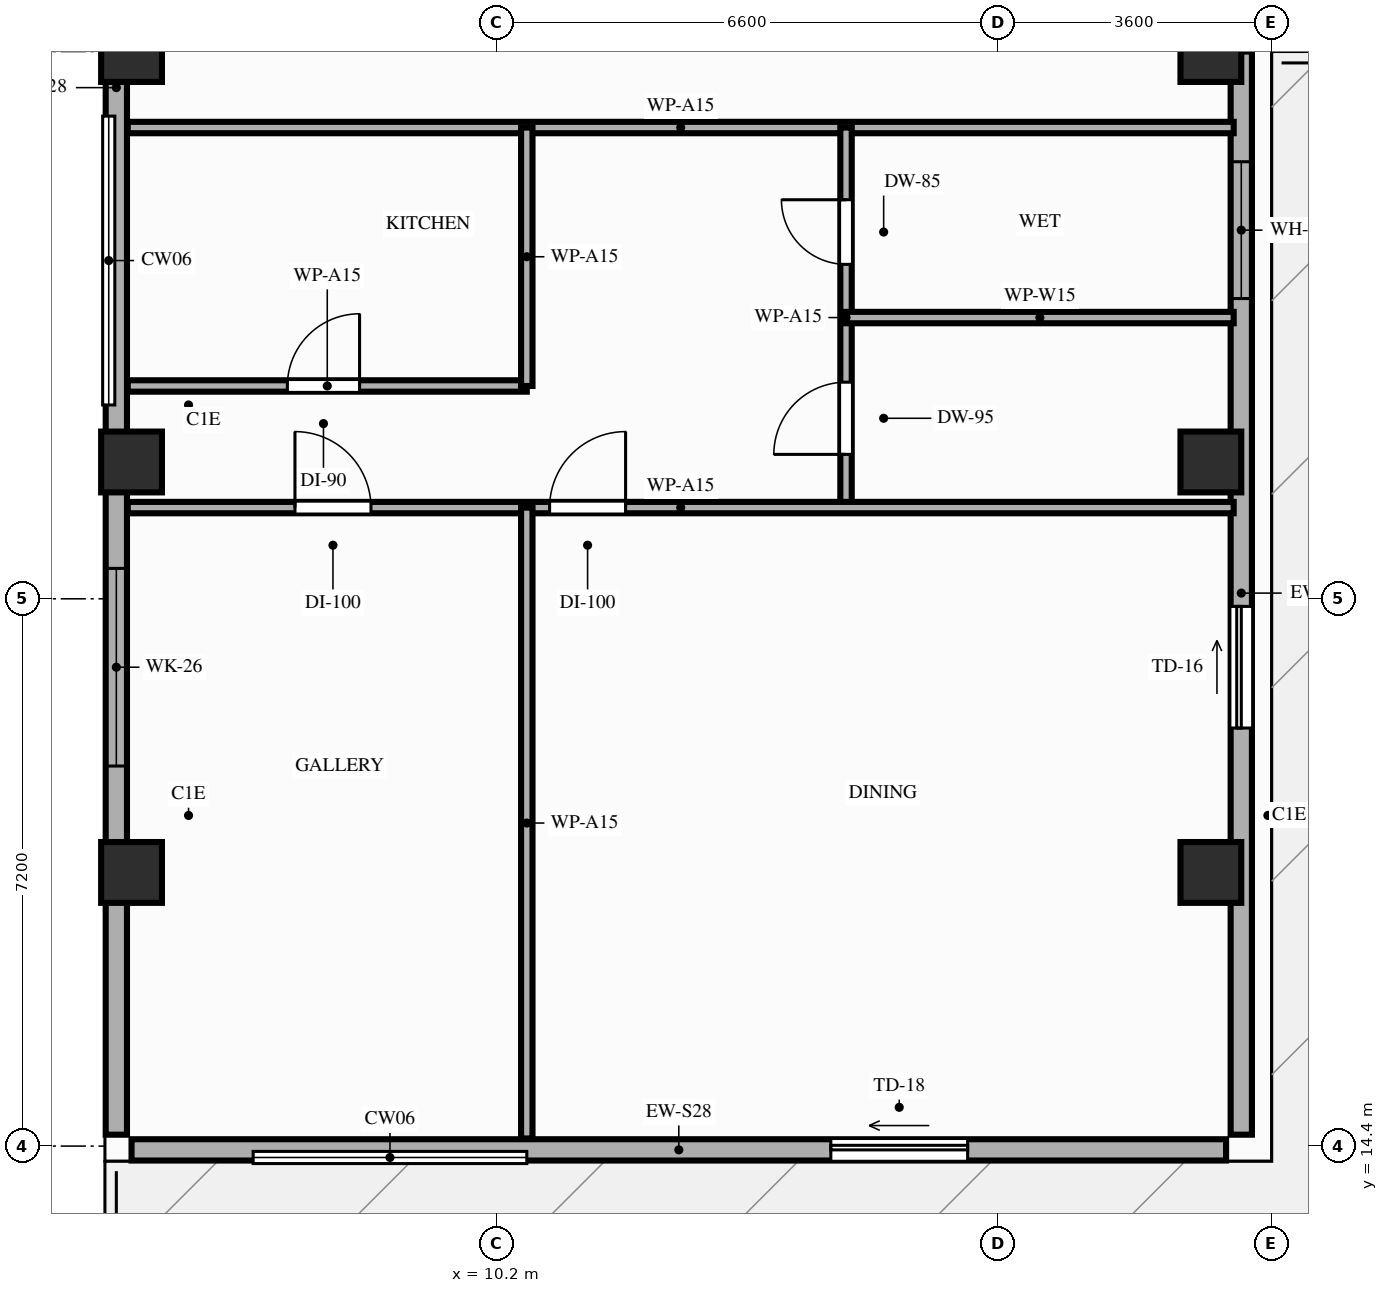
"""IFC4 building model, lengths in metres.
Left out: names, types, materials, properties, quantities, classifications, styles, units other than length and angle.
Written with IfcOpenShell. Run it as: python <this file> out.ifc"""

import sys

from ifc_helpers import new_model, si_unit, direction, frame, frame_2d, origin, origin_2d, place, context, subcontext, project, spatial, rectangle, extrude, element, fill, save


model = new_model("IFC4")
c1 = context("Model", 3, precision=1e-05, world=origin(), true_north=direction((0.0, 1.0)))
c2 = subcontext(c1, "Body", "Model", "MODEL_VIEW")
j1 = project(units=[si_unit("LENGTHUNIT", "METRE"), si_unit("PLANEANGLEUNIT", "RADIAN")], contexts=[c1])
p1 = place(None, origin())
s1 = spatial("IfcSite", under=j1, at=p1, CompositionType="ELEMENT")
p2 = place(p1, origin())
s2 = spatial("IfcBuilding", under=s1, at=p2, CompositionType="ELEMENT")
p3 = place(p2, frame((0.0, 0.0, 250.4)))
s3 = spatial("IfcBuildingStorey", under=s2, at=p3, CompositionType="ELEMENT", Elevation=250.4)
for number, where, z_axis, x_axis in (
    (1, (5.4, 18.0, 0.0), (0.0, 0.0, 1.0), (1.0, 0.0, 0.0)),
    (2, (19.6, 18.0, 0.0), (0.0, 0.0, 1.0), (1.0, 0.0, 0.0)),
    (3, (5.4, 23.4, 0.0), (0.0, 0.0, 1.0), (1.0, 0.0, 0.0)),
    (4, (19.6, 23.4, 0.0), (0.0, 0.0, 1.0), (1.0, 0.0, 0.0)),
    (5, (5.4, 28.8, 0.0), (0.0, 0.0, 1.0), (1.0, 0.0, 0.0)),
    (6, (19.6, 28.8, 0.0), (0.0, 0.0, 1.0), (1.0, 0.0, 0.0)),
):
    element("IfcColumn", number, at=place(p3, frame(where, z_axis=z_axis, x_axis=x_axis)), inside=s3, PredefinedType="COLUMN", context=c2, shape_type="SweptSolid", body=[
        extrude(rectangle(XDim=0.8, YDim=0.8, at=origin_2d()), origin(), (0.0, 0.0, 1.0), 3.8),
    ])
p4 = place(p3, frame((5.4, 14.35, 0.0), z_axis=(0.0, 0.0, 1.0), x_axis=(1.0, 0.0, 0.0)))
e7 = element("IfcWall", 7, at=p4, inside=s3, PredefinedType="STANDARD", context=c2, shape_type="SweptSolid", body=[
    extrude(rectangle(XDim=14.4, YDim=0.28, at=frame_2d((7.2, 0.0))), origin(), (0.0, 0.0, 1.0), 3.58),
])
p5 = place(p4, frame((9.2, 0.0, 0.0)))
e8 = element("IfcOpeningElement", 8, at=p5, cuts=e7, PredefinedType="OPENING", context=c2, shape_type="SweptSolid", body=[
    extrude(rectangle(XDim=1.8, YDim=2.2, at=frame_2d((0.9, 1.1))), frame((0.0, 0.15, 0.0), z_axis=(0.0, -1.0, 0.0), x_axis=(1.0, 0.0, 0.0)), (0.0, 0.0, 1.0), 0.3),
])
p6 = place(p3, frame((5.2, 42.1, 0.0), z_axis=(0.0, 0.0, 1.0), x_axis=(0.0, -1.0, 0.0)))
e9 = element("IfcWall", 9, at=p6, inside=s3, PredefinedType="STANDARD", context=c2, shape_type="SweptSolid", body=[
    extrude(rectangle(XDim=27.55, YDim=0.28, at=frame_2d((13.775, 0.0))), origin(), (0.0, 0.0, 1.0), 3.58),
])
p7 = place(p6, frame((20.1, 0.0, 0.85)))
e10 = element("IfcOpeningElement", 10, at=p7, cuts=e9, PredefinedType="OPENING", context=c2, shape_type="SweptSolid", body=[
    extrude(rectangle(XDim=2.6, YDim=2.2, at=frame_2d((1.3, 1.1))), frame((0.0, 0.15, 0.0), z_axis=(0.0, -1.0, 0.0), x_axis=(1.0, 0.0, 0.0)), (0.0, 0.0, 1.0), 0.3),
])
p8 = place(p6, frame((3.4, 0.0, 0.85)))
e11 = element("IfcOpeningElement", 11, at=p8, cuts=e9, PredefinedType="OPENING", context=c2, shape_type="SweptSolid", body=[
    extrude(rectangle(XDim=2.6, YDim=2.2, at=frame_2d((1.3, 1.1))), frame((0.0, 0.15, 0.0), z_axis=(0.0, -1.0, 0.0), x_axis=(1.0, 0.0, 0.0)), (0.0, 0.0, 1.0), 0.3),
])
p9 = place(p3, frame((20.0, 14.55, 0.0), z_axis=(0.0, 0.0, 1.0), x_axis=(0.0, 1.0, 0.0)))
e12 = element("IfcWall", 12, at=p9, inside=s3, PredefinedType="STANDARD", context=c2, shape_type="SweptSolid", body=[
    extrude(rectangle(XDim=14.25, YDim=0.28, at=frame_2d((7.125, 0.0))), origin(), (0.0, 0.0, 1.0), 3.58),
])
p10 = place(p9, frame((11.0, 0.0, 0.85)))
e13 = element("IfcOpeningElement", 13, at=p10, cuts=e12, PredefinedType="OPENING", context=c2, shape_type="SweptSolid", body=[
    extrude(rectangle(XDim=1.8, YDim=1.75, at=frame_2d((0.9, 0.875))), frame((0.0, 0.15, 0.0), z_axis=(0.0, -1.0, 0.0), x_axis=(1.0, 0.0, 0.0)), (0.0, 0.0, 1.0), 0.3),
])
p11 = place(p9, frame((5.35, 0.0, 0.0)))
e14 = element("IfcOpeningElement", 14, at=p11, cuts=e12, PredefinedType="OPENING", context=c2, shape_type="SweptSolid", body=[
    extrude(rectangle(XDim=1.6, YDim=2.15, at=frame_2d((0.8, 1.075))), frame((0.0, 0.15, 0.0), z_axis=(0.0, -1.0, 0.0), x_axis=(1.0, 0.0, 0.0)), (0.0, 0.0, 1.0), 0.3),
])
p12 = place(p3, frame((5.35, 27.8, 0.0), z_axis=(0.0, 0.0, 1.0), x_axis=(1.0, 0.0, 0.0)))
e15 = element("IfcWall", 15, at=p12, inside=s3, PredefinedType="PARTITIONING", context=c2, shape_type="SweptSolid", body=[
    extrude(rectangle(XDim=14.55, YDim=0.15, at=frame_2d((7.275, 0.0))), origin(), (0.0, 0.0, 1.0), 3.58),
])
p13 = place(p3, frame((5.35, 24.4, 0.0), z_axis=(0.0, 0.0, 1.0), x_axis=(1.0, 0.0, 0.0)))
e16 = element("IfcWall", 16, at=p13, inside=s3, PredefinedType="PARTITIONING", context=c2, shape_type="SweptSolid", body=[
    extrude(rectangle(XDim=5.25, YDim=0.15, at=frame_2d((2.625, 0.0))), origin(), (0.0, 0.0, 1.0), 3.58),
])
p14 = place(p13, frame((2.1, 0.0, 0.0)))
e17 = element("IfcOpeningElement", 17, at=p14, cuts=e16, PredefinedType="OPENING", context=c2, shape_type="SweptSolid", body=[
    extrude(rectangle(XDim=0.95, YDim=2.15, at=frame_2d((0.475, 1.075))), frame((0.0, 0.085, 0.0), z_axis=(0.0, -1.0, 0.0), x_axis=(1.0, 0.0, 0.0)), (0.0, 0.0, 1.0), 0.17),
])
p15 = place(p3, frame((10.6, 24.4, 0.0), z_axis=(0.0, 0.0, 1.0), x_axis=(0.0, 1.0, 0.0)))
e18 = element("IfcWall", 18, at=p15, inside=s3, PredefinedType="PARTITIONING", context=c2, shape_type="SweptSolid", body=[
    extrude(rectangle(XDim=3.4, YDim=0.15, at=frame_2d((1.7, 0.0))), origin(), (0.0, 0.0, 1.0), 3.58),
])
p16 = place(p3, frame((14.8, 22.8, 0.0), z_axis=(0.0, 0.0, 1.0), x_axis=(0.0, 1.0, 0.0)))
e19 = element("IfcWall", 19, at=p16, inside=s3, PredefinedType="PARTITIONING", context=c2, shape_type="SweptSolid", body=[
    extrude(rectangle(XDim=5.0, YDim=0.15, at=frame_2d((2.5, 0.0))), origin(), (0.0, 0.0, 1.0), 3.58),
])
p17 = place(p16, frame((3.2, 0.0, 0.0)))
e20 = element("IfcOpeningElement", 20, at=p17, cuts=e19, PredefinedType="OPENING", context=c2, shape_type="SweptSolid", body=[
    extrude(rectangle(XDim=0.85, YDim=2.1, at=frame_2d((0.425, 1.05))), frame((0.0, 0.085, 0.0), z_axis=(0.0, -1.0, 0.0), x_axis=(1.0, 0.0, 0.0)), (0.0, 0.0, 1.0), 0.17),
])
p18 = place(p16, frame((0.7, 0.0, 0.0)))
e21 = element("IfcOpeningElement", 21, at=p18, cuts=e19, PredefinedType="OPENING", context=c2, shape_type="SweptSolid", body=[
    extrude(rectangle(XDim=0.95, YDim=2.1, at=frame_2d((0.475, 1.05))), frame((0.0, 0.085, 0.0), z_axis=(0.0, -1.0, 0.0), x_axis=(1.0, 0.0, 0.0)), (0.0, 0.0, 1.0), 0.17),
])
p19 = place(p3, frame((5.35, 22.8, 0.0), z_axis=(0.0, 0.0, 1.0), x_axis=(1.0, 0.0, 0.0)))
e22 = element("IfcWall", 22, at=p19, inside=s3, PredefinedType="PARTITIONING", context=c2, shape_type="SweptSolid", body=[
    extrude(rectangle(XDim=14.55, YDim=0.15, at=frame_2d((7.275, 0.0))), origin(), (0.0, 0.0, 1.0), 3.58),
])
p20 = place(p19, frame((2.2, 0.0, 0.0)))
e23 = element("IfcOpeningElement", 23, at=p20, cuts=e22, PredefinedType="OPENING", context=c2, shape_type="SweptSolid", body=[
    extrude(rectangle(XDim=1.0, YDim=2.15, at=frame_2d((0.5, 1.075))), frame((0.0, 0.085, 0.0), z_axis=(0.0, -1.0, 0.0), x_axis=(1.0, 0.0, 0.0)), (0.0, 0.0, 1.0), 0.17),
])
p21 = place(p19, frame((5.55, 0.0, 0.0)))
e24 = element("IfcOpeningElement", 24, at=p21, cuts=e22, PredefinedType="OPENING", context=c2, shape_type="SweptSolid", body=[
    extrude(rectangle(XDim=1.0, YDim=2.15, at=frame_2d((0.5, 1.075))), frame((0.0, 0.085, 0.0), z_axis=(0.0, -1.0, 0.0), x_axis=(1.0, 0.0, 0.0)), (0.0, 0.0, 1.0), 0.17),
])
p22 = place(p3, frame((10.6, 14.5, 0.0), z_axis=(0.0, 0.0, 1.0), x_axis=(0.0, 1.0, 0.0)))
e25 = element("IfcWall", 25, at=p22, inside=s3, PredefinedType="PARTITIONING", context=c2, shape_type="SweptSolid", body=[
    extrude(rectangle(XDim=8.3, YDim=0.15, at=frame_2d((4.15, 0.0))), origin(), (0.0, 0.0, 1.0), 3.58),
])
p23 = place(p3, frame((14.8, 25.3, 0.0), z_axis=(0.0, 0.0, 1.0), x_axis=(1.0, 0.0, 0.0)))
e26 = element("IfcWall", 26, at=p23, inside=s3, PredefinedType="PARTITIONING", context=c2, shape_type="SweptSolid", body=[
    extrude(rectangle(XDim=5.1, YDim=0.15, at=frame_2d((2.55, 0.0))), origin(), (0.0, 0.0, 1.0), 3.58),
])
p24 = place(p7, origin())
e27 = element("IfcWindow", 27, at=p24, inside=s3, PartitioningType="SINGLE_PANEL", PredefinedType="WINDOW", context=c2, shape_type="SweptSolid", body=[
    extrude(rectangle(XDim=2.6, YDim=2.2, at=frame_2d((1.3, 1.1))), frame((0.0, 0.03, 0.0), z_axis=(0.0, -1.0, 0.0), x_axis=(1.0, 0.0, 0.0)), (0.0, 0.0, 1.0), 0.06),
])
fill(e10, e27)
p25 = place(p10, origin())
e28 = element("IfcWindow", 28, at=p25, inside=s3, PartitioningType="SINGLE_PANEL", PredefinedType="WINDOW", context=c2, shape_type="SweptSolid", body=[
    extrude(rectangle(XDim=1.8, YDim=1.75, at=frame_2d((0.9, 0.875))), frame((0.0, 0.03, 0.0), z_axis=(0.0, -1.0, 0.0), x_axis=(1.0, 0.0, 0.0)), (0.0, 0.0, 1.0), 0.06),
])
fill(e13, e28)
p26 = place(p5, origin())
e29 = element("IfcDoor", 29, at=p26, inside=s3, OperationType="SLIDING_TO_LEFT", PredefinedType="DOOR", context=c2, shape_type="SweptSolid", body=[
    extrude(rectangle(XDim=1.8, YDim=2.2, at=frame_2d((0.9, 1.1))), frame((0.0, 0.025, 0.0), z_axis=(0.0, -1.0, 0.0), x_axis=(1.0, 0.0, 0.0)), (0.0, 0.0, 1.0), 0.05),
])
fill(e8, e29)
p27 = place(p11, origin())
e30 = element("IfcDoor", 30, at=p27, inside=s3, OperationType="SLIDING_TO_RIGHT", PredefinedType="DOOR", context=c2, shape_type="SweptSolid", body=[
    extrude(rectangle(XDim=1.6, YDim=2.15, at=frame_2d((0.8, 1.075))), frame((0.0, 0.025, 0.0), z_axis=(0.0, -1.0, 0.0), x_axis=(1.0, 0.0, 0.0)), (0.0, 0.0, 1.0), 0.05),
])
fill(e14, e30)
p28 = place(p17, origin())
e31 = element("IfcDoor", 31, at=p28, inside=s3, OperationType="SINGLE_SWING_RIGHT", PredefinedType="DOOR", context=c2, shape_type="SweptSolid", body=[
    extrude(rectangle(XDim=0.85, YDim=2.1, at=frame_2d((0.425, 1.05))), frame((0.0, 0.025, 0.0), z_axis=(0.0, -1.0, 0.0), x_axis=(1.0, 0.0, 0.0)), (0.0, 0.0, 1.0), 0.05),
])
fill(e20, e31)
p29 = place(p18, origin())
e32 = element("IfcDoor", 32, at=p29, inside=s3, OperationType="SINGLE_SWING_LEFT", PredefinedType="DOOR", context=c2, shape_type="SweptSolid", body=[
    extrude(rectangle(XDim=0.95, YDim=2.1, at=frame_2d((0.475, 1.05))), frame((0.0, 0.025, 0.0), z_axis=(0.0, -1.0, 0.0), x_axis=(1.0, 0.0, 0.0)), (0.0, 0.0, 1.0), 0.05),
])
fill(e21, e32)
p30 = place(p14, origin())
e33 = element("IfcDoor", 33, at=p30, inside=s3, OperationType="SINGLE_SWING_RIGHT", PredefinedType="DOOR", context=c2, shape_type="SweptSolid", body=[
    extrude(rectangle(XDim=0.95, YDim=2.15, at=frame_2d((0.475, 1.075))), frame((0.0, 0.025, 0.0), z_axis=(0.0, -1.0, 0.0), x_axis=(1.0, 0.0, 0.0)), (0.0, 0.0, 1.0), 0.05),
])
fill(e17, e33)
p31 = place(p20, origin())
e34 = element("IfcDoor", 34, at=p31, inside=s3, OperationType="SINGLE_SWING_LEFT", PredefinedType="DOOR", context=c2, shape_type="SweptSolid", body=[
    extrude(rectangle(XDim=1.0, YDim=2.15, at=frame_2d((0.5, 1.075))), frame((0.0, 0.025, 0.0), z_axis=(0.0, -1.0, 0.0), x_axis=(1.0, 0.0, 0.0)), (0.0, 0.0, 1.0), 0.05),
])
fill(e23, e34)
p32 = place(p21, origin())
e35 = element("IfcDoor", 35, at=p32, inside=s3, OperationType="SINGLE_SWING_RIGHT", PredefinedType="DOOR", context=c2, shape_type="SweptSolid", body=[
    extrude(rectangle(XDim=1.0, YDim=2.15, at=frame_2d((0.5, 1.075))), frame((0.0, 0.025, 0.0), z_axis=(0.0, -1.0, 0.0), x_axis=(1.0, 0.0, 0.0)), (0.0, 0.0, 1.0), 0.05),
])
fill(e24, e35)
save(model, sys.argv[1])
